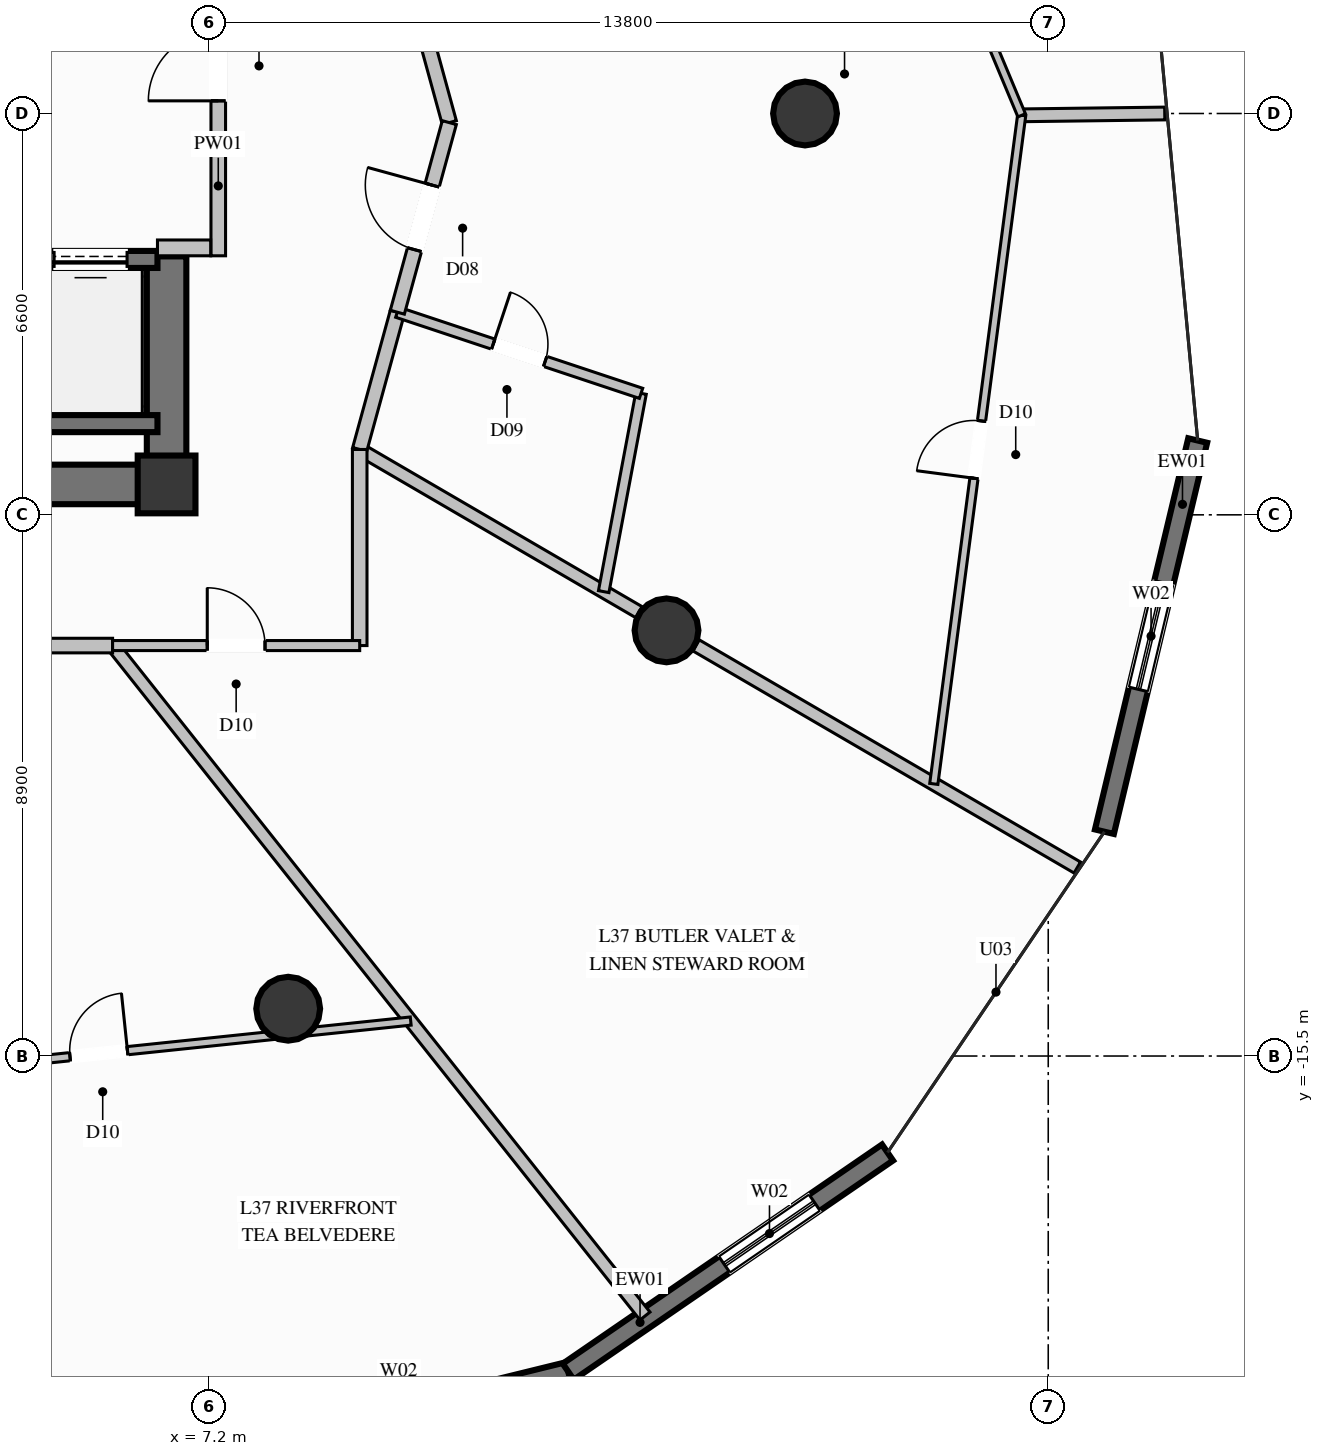
"""IFC4 building model, lengths in metres.
Left out: names, types, materials, properties, quantities, classifications, styles, units other than length and angle.
Written with IfcOpenShell. Run it as: python <this file> out.ifc"""

import sys

from ifc_helpers import new_model, si_unit, direction, frame, frame_2d, origin, origin_2d, place, context, subcontext, project, spatial, rectangle, circle, extrude, element, fill, save


model = new_model("IFC4")
c1 = context("Model", 3, precision=1e-05, world=origin(), true_north=direction((0.0, 1.0)))
c2 = subcontext(c1, "Body", "Model", "MODEL_VIEW")
j1 = project(units=[si_unit("LENGTHUNIT", "METRE"), si_unit("PLANEANGLEUNIT", "RADIAN")], contexts=[c1])
p1 = place(None, origin())
s1 = spatial("IfcSite", under=j1, at=p1, CompositionType="ELEMENT")
p2 = place(p1, origin())
s2 = spatial("IfcBuilding", under=s1, at=p2, CompositionType="ELEMENT")
p3 = place(p2, frame((0.0, 0.0, 145.8)))
s3 = spatial("IfcBuildingStorey", under=s2, at=p3, CompositionType="ELEMENT", Elevation=145.8)
p4 = place(p3, frame((6.5, -6.1, 0.0), z_axis=(0.0, 0.0, 1.0), x_axis=(1.0, 0.0, 0.0)))
e1 = element("IfcColumn", 1, at=p4, inside=s3, PredefinedType="COLUMN", context=c2, shape_type="SweptSolid", body=[
    extrude(rectangle(XDim=0.95, YDim=0.95, at=origin_2d()), origin(), (0.0, 0.0, 1.0), 3.6),
])
p5 = place(p3, frame((4.15, -6.1, 0.0), z_axis=(0.0, 0.0, 1.0), x_axis=(1.0, 0.0, 0.0)))
e2 = element("IfcWall", 2, at=p5, inside=s3, PredefinedType="SHEAR", context=c2, shape_type="SweptSolid", body=[
    extrude(rectangle(XDim=2.025, YDim=0.65, at=frame_2d((1.013, 0.0))), origin(), (0.0, 0.0, 1.0), 3.6),
])
p6 = place(p3, frame((6.5, -6.425, 0.0), z_axis=(0.0, 0.0, 1.0), x_axis=(0.0, 1.0, 0.0)))
e3 = element("IfcWall", 3, at=p6, inside=s3, PredefinedType="SHEAR", context=c2, shape_type="SweptSolid", body=[
    extrude(rectangle(XDim=4.075, YDim=0.65, at=frame_2d((2.038, 0.0))), origin(), (0.0, 0.0, 1.0), 3.6),
])
for number, where, z_axis, x_axis in (
    (4, (17.0, 0.0, 0.0), (0.0, 0.0, 1.0), (1.0, 0.0, 0.0)),
    (5, (8.5, -14.722, 0.0), (0.0, 0.0, 1.0), (1.0, 0.0, 0.0)),
    (6, (14.722, -8.5, 0.0), (0.0, 0.0, 1.0), (1.0, 0.0, 0.0)),
):
    element("IfcColumn", number, at=place(p3, frame(where, z_axis=z_axis, x_axis=x_axis)), inside=s3, PredefinedType="COLUMN", context=c2, shape_type="SweptSolid", body=[
        extrude(circle(Radius=0.525, at=origin_2d()), origin(), (0.0, 0.0, 1.0), 3.6),
    ])
p7 = place(p3, frame((23.458, -5.378, 0.0), z_axis=(0.0, 0.0, 1.0), x_axis=(-0.231941586556, -0.972729716019, 0.0)))
e7 = element("IfcWall", 7, at=p7, inside=s3, PredefinedType="SOLIDWALL", context=c2, shape_type="SweptSolid", body=[
    extrude(rectangle(XDim=6.614, YDim=0.32, at=frame_2d((3.307, 0.0))), origin(), (0.0, 0.0, 1.0), 3.35),
])
p8 = place(p7, frame((2.407, 0.0, 0.35)))
e8 = element("IfcOpeningElement", 8, at=p8, cuts=e7, PredefinedType="OPENING", context=c2, shape_type="SweptSolid", body=[
    extrude(rectangle(XDim=1.8, YDim=2.6, at=frame_2d((0.9, 1.3))), frame((0.0, 0.17, 0.0), z_axis=(0.0, -1.0, 0.0), x_axis=(1.0, 0.0, 0.0)), (0.0, 0.0, 1.0), 0.34),
])
p9 = place(p3, frame((13.106, -20.691, 0.0), z_axis=(0.0, 0.0, 1.0), x_axis=(-0.971073377094, -0.238781272926, 0.0)))
e9 = element("IfcWall", 9, at=p9, inside=s3, PredefinedType="SOLIDWALL", context=c2, shape_type="SweptSolid", body=[
    extrude(rectangle(XDim=6.613, YDim=0.32, at=frame_2d((3.307, 0.0))), origin(), (0.0, 0.0, 1.0), 3.35),
])
p10 = place(p9, frame((1.973, 0.0, 0.35)))
e10 = element("IfcOpeningElement", 10, at=p10, cuts=e9, PredefinedType="OPENING", context=c2, shape_type="SweptSolid", body=[
    extrude(rectangle(XDim=1.8, YDim=2.6, at=frame_2d((0.9, 1.3))), frame((0.0, 0.17, 0.0), z_axis=(0.0, -1.0, 0.0), x_axis=(1.0, 0.0, 0.0)), (0.0, 0.0, 1.0), 0.34),
])
p11 = place(p3, frame((18.357, -17.087, 0.0), z_axis=(0.0, 0.0, 1.0), x_axis=(-0.824484596177, -0.565884396911, 0.0)))
e11 = element("IfcWall", 11, at=p11, inside=s3, PredefinedType="SOLIDWALL", context=c2, shape_type="SweptSolid", body=[
    extrude(rectangle(XDim=6.369, YDim=0.32, at=frame_2d((3.185, 0.0))), origin(), (0.0, 0.0, 1.0), 3.35),
])
p12 = place(p11, frame((1.455, 0.0, 0.35)))
e12 = element("IfcOpeningElement", 12, at=p12, cuts=e11, PredefinedType="OPENING", context=c2, shape_type="SweptSolid", body=[
    extrude(rectangle(XDim=1.8, YDim=2.6, at=frame_2d((0.9, 1.3))), frame((0.0, 0.17, 0.0), z_axis=(0.0, -1.0, 0.0), x_axis=(1.0, 0.0, 0.0)), (0.0, 0.0, 1.0), 0.34),
])
p13 = place(p3, frame((4.15, -5.1, 0.0), z_axis=(0.0, 0.0, 1.0), x_axis=(1.0, 0.0, 0.0)))
e13 = element("IfcWall", 13, at=p13, inside=s3, PredefinedType="SOLIDWALL", context=c2, shape_type="SweptSolid", body=[
    extrude(rectangle(XDim=2.2, YDim=0.28, at=frame_2d((1.1, 0.0))), origin(), (0.0, 0.0, 1.0), 3.35),
])
p14 = place(p3, frame((6.35, -2.4, 0.0), z_axis=(0.0, 0.0, 1.0), x_axis=(-1.0, 0.0, 0.0)))
e14 = element("IfcWall", 14, at=p14, inside=s3, PredefinedType="SOLIDWALL", context=c2, shape_type="SweptSolid", body=[
    extrude(rectangle(XDim=2.2, YDim=0.28, at=frame_2d((1.1, 0.0))), origin(), (0.0, 0.0, 1.0), 3.35),
])
p15 = place(p14, frame((0.5, 0.0, 0.0)))
e15 = element("IfcOpeningElement", 15, at=p15, cuts=e14, PredefinedType="OPENING", context=c2, shape_type="SweptSolid", body=[
    extrude(rectangle(XDim=1.2, YDim=2.2, at=frame_2d((0.6, 1.1))), frame((0.0, 0.15, 0.0), z_axis=(0.0, -1.0, 0.0), x_axis=(1.0, 0.0, 0.0)), (0.0, 0.0, 1.0), 0.3),
])
p16 = place(p3, frame((7.35, -2.34, 0.0), z_axis=(0.0, 0.0, 1.0), x_axis=(0.0, 1.0, 0.0)))
e16 = element("IfcWall", 16, at=p16, inside=s3, PredefinedType="PARTITIONING", context=c2, shape_type="SweptSolid", body=[
    extrude(rectangle(XDim=5.07, YDim=0.24, at=frame_2d((2.535, 0.0))), origin(), (0.0, 0.0, 1.0), 2.435),
])
p17 = place(p16, frame((2.548, 0.0, 0.0)))
e17 = element("IfcOpeningElement", 17, at=p17, cuts=e16, PredefinedType="OPENING", context=c2, shape_type="SweptSolid", body=[
    extrude(rectangle(XDim=1.15, YDim=2.2, at=frame_2d((0.575, 1.1))), frame((0.0, 0.13, 0.0), z_axis=(0.0, -1.0, 0.0), x_axis=(1.0, 0.0, 0.0)), (0.0, 0.0, 1.0), 0.26),
])
p18 = place(p3, frame((6.35, -2.21, 0.0), z_axis=(0.0, 0.0, 1.0), x_axis=(1.0, 0.0, 0.0)))
e18 = element("IfcWall", 18, at=p18, inside=s3, PredefinedType="PARTITIONING", context=c2, shape_type="SweptSolid", body=[
    extrude(rectangle(XDim=0.875, YDim=0.26, at=frame_2d((0.438, 0.0))), origin(), (0.0, 0.0, 1.0), 3.35),
])
p19 = place(p3, frame((9.676, -5.525, 0.0), z_axis=(0.0, 0.0, 1.0), x_axis=(0.864030429533, -0.503439586088, 0.0)))
e19 = element("IfcWall", 19, at=p19, inside=s3, PredefinedType="PARTITIONING", context=c2, shape_type="SweptSolid", body=[
    extrude(rectangle(XDim=5.313, YDim=0.21, at=frame_2d((2.657, 0.0))), origin(), (0.0, 0.0, 1.0), 2.791),
])
p20 = place(p3, frame((15.208, -8.747, 0.0), z_axis=(0.0, 0.0, 1.0), x_axis=(0.864059428721, -0.503389812808, 0.0)))
e20 = element("IfcWall", 20, at=p20, inside=s3, PredefinedType="PARTITIONING", context=c2, shape_type="SweptSolid", body=[
    extrude(rectangle(XDim=7.256, YDim=0.21, at=frame_2d((3.628, 0.0))), origin(), (0.0, 0.0, 1.0), 3.35),
])
p21 = place(p3, frame((9.676, -5.525, 0.0), z_axis=(0.0, 0.0, 1.0), x_axis=(0.264467775372, 0.964394522895, 0.0)))
e21 = element("IfcWall", 21, at=p21, inside=s3, PredefinedType="PARTITIONING", context=c2, shape_type="SweptSolid", body=[
    extrude(rectangle(XDim=2.34, YDim=0.24, at=frame_2d((1.17, 0.0))), origin(), (0.0, 0.0, 1.0), 3.35),
])
p22 = place(p3, frame((13.689, -7.863, 0.0), z_axis=(0.0, 0.0, 1.0), x_axis=(0.185039216189, 0.982731137429, 0.0)))
e22 = element("IfcWall", 22, at=p22, inside=s3, PredefinedType="PLUMBINGWALL", context=c2, shape_type="SweptSolid", body=[
    extrude(rectangle(XDim=3.318, YDim=0.175, at=frame_2d((1.659, 0.0))), origin(), (0.0, 0.0, 1.0), 3.35),
])
p23 = place(p3, frame((10.295, -3.268, 0.0), z_axis=(0.0, 0.0, 1.0), x_axis=(0.948827687615, -0.315794267231, 0.0)))
e23 = element("IfcWall", 23, at=p23, inside=s3, PredefinedType="PLUMBINGWALL", context=c2, shape_type="SweptSolid", body=[
    extrude(rectangle(XDim=4.224, YDim=0.175, at=frame_2d((2.112, 0.0))), origin(), (0.0, 0.0, 1.0), 3.35),
])
p24 = place(p23, frame((1.662, 0.0, 0.0)))
e24 = element("IfcOpeningElement", 24, at=p24, cuts=e23, PredefinedType="OPENING", context=c2, shape_type="SweptSolid", body=[
    extrude(rectangle(XDim=0.9, YDim=2.1, at=frame_2d((0.45, 1.05))), frame((0.0, 0.098, 0.0), z_axis=(0.0, -1.0, 0.0), x_axis=(1.0, 0.0, 0.0)), (0.0, 0.0, 1.0), 0.195),
])
p25 = place(p3, frame((20.563, -0.03, 0.0), z_axis=(0.0, 0.0, 1.0), x_axis=(0.99991857583, 0.01276094468, 0.0)))
e25 = element("IfcWall", 25, at=p25, inside=s3, PredefinedType="PARTITIONING", context=c2, shape_type="SweptSolid", body=[
    extrude(rectangle(XDim=2.353, YDim=0.21, at=frame_2d((1.177, 0.0))), origin(), (0.0, 0.0, 1.0), 3.35),
])
p26 = place(p3, frame((11.15, -0.15, 0.0), z_axis=(0.0, 0.0, 1.0), x_axis=(-0.264447801629, 0.964400000111, 0.0)))
e26 = element("IfcWall", 26, at=p26, inside=s3, PredefinedType="PARTITIONING", context=c2, shape_type="SweptSolid", body=[
    extrude(rectangle(XDim=5.573, YDim=0.24, at=frame_2d((2.787, 0.0))), origin(), (0.0, 0.0, 1.0), 2.985),
])
p27 = place(p3, frame((10.295, -3.268, 0.0), z_axis=(0.0, 0.0, 1.0), x_axis=(0.264433345006, 0.96440396414, 0.0)))
e27 = element("IfcWall", 27, at=p27, inside=s3, PredefinedType="PARTITIONING", context=c2, shape_type="SweptSolid", body=[
    extrude(rectangle(XDim=3.233, YDim=0.24, at=frame_2d((1.617, 0.0))), origin(), (0.0, 0.0, 1.0), 2.985),
])
p28 = place(p27, frame((1.067, 0.0, 0.0)))
e28 = element("IfcOpeningElement", 28, at=p28, cuts=e27, PredefinedType="OPENING", context=c2, shape_type="SweptSolid", body=[
    extrude(rectangle(XDim=1.1, YDim=2.3, at=frame_2d((0.55, 1.15))), frame((0.0, 0.13, 0.0), z_axis=(0.0, -1.0, 0.0), x_axis=(1.0, 0.0, 0.0)), (0.0, 0.0, 1.0), 0.26),
])
p29 = place(p3, frame((19.118, -11.025, 0.0), z_axis=(0.0, 0.0, 1.0), x_axis=(0.130310428057, 0.991473243381, 0.0)))
e29 = element("IfcWall", 29, at=p29, inside=s3, PredefinedType="PARTITIONING", context=c2, shape_type="SweptSolid", body=[
    extrude(rectangle(XDim=11.089, YDim=0.135, at=frame_2d((5.545, 0.0))), origin(), (0.0, 0.0, 1.0), 3.35),
])
p30 = place(p29, frame((5.07, 0.0, 0.0)))
e30 = element("IfcOpeningElement", 30, at=p30, cuts=e29, PredefinedType="OPENING", context=c2, shape_type="SweptSolid", body=[
    extrude(rectangle(XDim=0.95, YDim=2.1, at=frame_2d((0.475, 1.05))), frame((0.0, 0.078, 0.0), z_axis=(0.0, -1.0, 0.0), x_axis=(1.0, 0.0, 0.0)), (0.0, 0.0, 1.0), 0.155),
])
p31 = place(p3, frame((20.563, -0.03, 0.0), z_axis=(0.0, 0.0, 1.0), x_axis=(-0.385825151615, 0.922571922606, 0.0)))
e31 = element("IfcWall", 31, at=p31, inside=s3, PredefinedType="PARTITIONING", context=c2, shape_type="SweptSolid", body=[
    extrude(rectangle(XDim=10.329, YDim=0.135, at=frame_2d((5.165, 0.0))), origin(), (0.0, 0.0, 1.0), 3.35),
])
p32 = place(p31, frame((4.689, 0.0, 0.0)))
e32 = element("IfcOpeningElement", 32, at=p32, cuts=e31, PredefinedType="OPENING", context=c2, shape_type="SweptSolid", body=[
    extrude(rectangle(XDim=0.95, YDim=2.1, at=frame_2d((0.475, 1.05))), frame((0.0, 0.078, 0.0), z_axis=(0.0, -1.0, 0.0), x_axis=(1.0, 0.0, 0.0)), (0.0, 0.0, 1.0), 0.155),
])
p33 = place(p3, frame((5.612, -8.75, 0.0), z_axis=(0.0, 0.0, 1.0), x_axis=(0.62188276913, -0.783110350755, 0.0)))
e33 = element("IfcWall", 33, at=p33, inside=s3, PredefinedType="PARTITIONING", context=c2, shape_type="SweptSolid", body=[
    extrude(rectangle(XDim=14.08, YDim=0.21, at=frame_2d((7.04, 0.0))), origin(), (0.0, 0.0, 1.0), 3.35),
])
p34 = place(p3, frame((0.0, -8.75, 0.0), z_axis=(0.0, 0.0, 1.0), x_axis=(1.0, 0.0, 0.0)))
e34 = element("IfcWall", 34, at=p34, inside=s3, PredefinedType="PARTITIONING", context=c2, shape_type="SweptSolid", body=[
    extrude(rectangle(XDim=5.612, YDim=0.24, at=frame_2d((2.806, 0.0))), origin(), (0.0, 0.0, 1.0), 3.35),
])
p35 = place(p3, frame((0.254, -15.998, 0.0), z_axis=(0.0, 0.0, 1.0), x_axis=(0.994576924976, 0.104003559097, 0.0)))
e35 = element("IfcWall", 35, at=p35, inside=s3, PredefinedType="PARTITIONING", context=c2, shape_type="SweptSolid", body=[
    extrude(rectangle(XDim=10.317, YDim=0.135, at=frame_2d((5.158, 0.0))), origin(), (0.0, 0.0, 1.0), 2.879),
])
p36 = place(p35, frame((4.683, 0.0, 0.0)))
e36 = element("IfcOpeningElement", 36, at=p36, cuts=e35, PredefinedType="OPENING", context=c2, shape_type="SweptSolid", body=[
    extrude(rectangle(XDim=0.95, YDim=2.1, at=frame_2d((0.475, 1.05))), frame((0.0, 0.078, 0.0), z_axis=(0.0, -1.0, 0.0), x_axis=(1.0, 0.0, 0.0)), (0.0, 0.0, 1.0), 0.155),
])
p37 = place(p3, frame((9.676, -8.75, 0.0), z_axis=(0.0, 0.0, 1.0), x_axis=(0.0, 1.0, 0.0)))
e37 = element("IfcWall", 37, at=p37, inside=s3, PredefinedType="PARTITIONING", context=c2, shape_type="SweptSolid", body=[
    extrude(rectangle(XDim=3.225, YDim=0.24, at=frame_2d((1.613, 0.0))), origin(), (0.0, 0.0, 1.0), 3.35),
])
p38 = place(p3, frame((5.612, -8.75, 0.0), z_axis=(0.0, 0.0, 1.0), x_axis=(1.0, 0.0, 0.0)))
e38 = element("IfcWall", 38, at=p38, inside=s3, PredefinedType="PARTITIONING", context=c2, shape_type="SweptSolid", body=[
    extrude(rectangle(XDim=4.064, YDim=0.165, at=frame_2d((2.032, 0.0))), origin(), (0.0, 0.0, 1.0), 3.35),
])
p39 = place(p38, frame((1.557, 0.0, 0.0)))
e39 = element("IfcOpeningElement", 39, at=p39, cuts=e38, PredefinedType="OPENING", context=c2, shape_type="SweptSolid", body=[
    extrude(rectangle(XDim=0.95, YDim=2.1, at=frame_2d((0.475, 1.05))), frame((0.0, 0.093, 0.0), z_axis=(0.0, -1.0, 0.0), x_axis=(1.0, 0.0, 0.0)), (0.0, 0.0, 1.0), 0.185),
])
p40 = place(p8, origin())
e40 = element("IfcWindow", 40, at=p40, inside=s3, PartitioningType="SINGLE_PANEL", PredefinedType="WINDOW", context=c2, shape_type="SweptSolid", body=[
    extrude(rectangle(XDim=1.8, YDim=2.6, at=frame_2d((0.9, 1.3))), frame((0.0, 0.03, 0.0), z_axis=(0.0, -1.0, 0.0), x_axis=(1.0, 0.0, 0.0)), (0.0, 0.0, 1.0), 0.06),
])
fill(e8, e40)
p41 = place(p12, origin())
e41 = element("IfcWindow", 41, at=p41, inside=s3, PartitioningType="SINGLE_PANEL", PredefinedType="WINDOW", context=c2, shape_type="SweptSolid", body=[
    extrude(rectangle(XDim=1.8, YDim=2.6, at=frame_2d((0.9, 1.3))), frame((0.0, 0.03, 0.0), z_axis=(0.0, -1.0, 0.0), x_axis=(1.0, 0.0, 0.0)), (0.0, 0.0, 1.0), 0.06),
])
fill(e12, e41)
p42 = place(p15, origin())
e42 = element("IfcDoor", 42, at=p42, inside=s3, OperationType="SLIDING_TO_LEFT", PredefinedType="DOOR", context=c2, shape_type="SweptSolid", body=[
    extrude(rectangle(XDim=1.2, YDim=2.2, at=frame_2d((0.6, 1.1))), frame((0.0, 0.025, 0.0), z_axis=(0.0, -1.0, 0.0), x_axis=(1.0, 0.0, 0.0)), (0.0, 0.0, 1.0), 0.05),
])
fill(e15, e42)
p43 = place(p17, origin())
e43 = element("IfcDoor", 43, at=p43, inside=s3, OperationType="SINGLE_SWING_LEFT", PredefinedType="DOOR", context=c2, shape_type="SweptSolid", body=[
    extrude(rectangle(XDim=1.15, YDim=2.2, at=frame_2d((0.575, 1.1))), frame((0.0, 0.025, 0.0), z_axis=(0.0, -1.0, 0.0), x_axis=(1.0, 0.0, 0.0)), (0.0, 0.0, 1.0), 0.05),
])
fill(e17, e43)
p44 = place(p24, origin())
e44 = element("IfcDoor", 44, at=p44, inside=s3, OperationType="SINGLE_SWING_LEFT", PredefinedType="DOOR", context=c2, shape_type="SweptSolid", body=[
    extrude(rectangle(XDim=0.9, YDim=2.1, at=frame_2d((0.45, 1.05))), frame((0.0, 0.025, 0.0), z_axis=(0.0, -1.0, 0.0), x_axis=(1.0, 0.0, 0.0)), (0.0, 0.0, 1.0), 0.05),
])
fill(e24, e44)
p45 = place(p28, origin())
e45 = element("IfcDoor", 45, at=p45, inside=s3, OperationType="SINGLE_SWING_RIGHT", PredefinedType="DOOR", context=c2, shape_type="SweptSolid", body=[
    extrude(rectangle(XDim=1.1, YDim=2.3, at=frame_2d((0.55, 1.15))), frame((0.0, 0.025, 0.0), z_axis=(0.0, -1.0, 0.0), x_axis=(1.0, 0.0, 0.0)), (0.0, 0.0, 1.0), 0.05),
])
fill(e28, e45)
p46 = place(p30, origin())
e46 = element("IfcDoor", 46, at=p46, inside=s3, OperationType="SINGLE_SWING_LEFT", PredefinedType="DOOR", context=c2, shape_type="SweptSolid", body=[
    extrude(rectangle(XDim=0.95, YDim=2.1, at=frame_2d((0.475, 1.05))), frame((0.0, 0.025, 0.0), z_axis=(0.0, -1.0, 0.0), x_axis=(1.0, 0.0, 0.0)), (0.0, 0.0, 1.0), 0.05),
])
fill(e30, e46)
p47 = place(p36, origin())
e47 = element("IfcDoor", 47, at=p47, inside=s3, OperationType="SINGLE_SWING_RIGHT", PredefinedType="DOOR", context=c2, shape_type="SweptSolid", body=[
    extrude(rectangle(XDim=0.95, YDim=2.1, at=frame_2d((0.475, 1.05))), frame((0.0, 0.025, 0.0), z_axis=(0.0, -1.0, 0.0), x_axis=(1.0, 0.0, 0.0)), (0.0, 0.0, 1.0), 0.05),
])
fill(e36, e47)
p48 = place(p39, origin())
e48 = element("IfcDoor", 48, at=p48, inside=s3, OperationType="SINGLE_SWING_LEFT", PredefinedType="DOOR", context=c2, shape_type="SweptSolid", body=[
    extrude(rectangle(XDim=0.95, YDim=2.1, at=frame_2d((0.475, 1.05))), frame((0.0, 0.025, 0.0), z_axis=(0.0, -1.0, 0.0), x_axis=(1.0, 0.0, 0.0)), (0.0, 0.0, 1.0), 0.05),
])
fill(e39, e48)
save(model, sys.argv[1])
